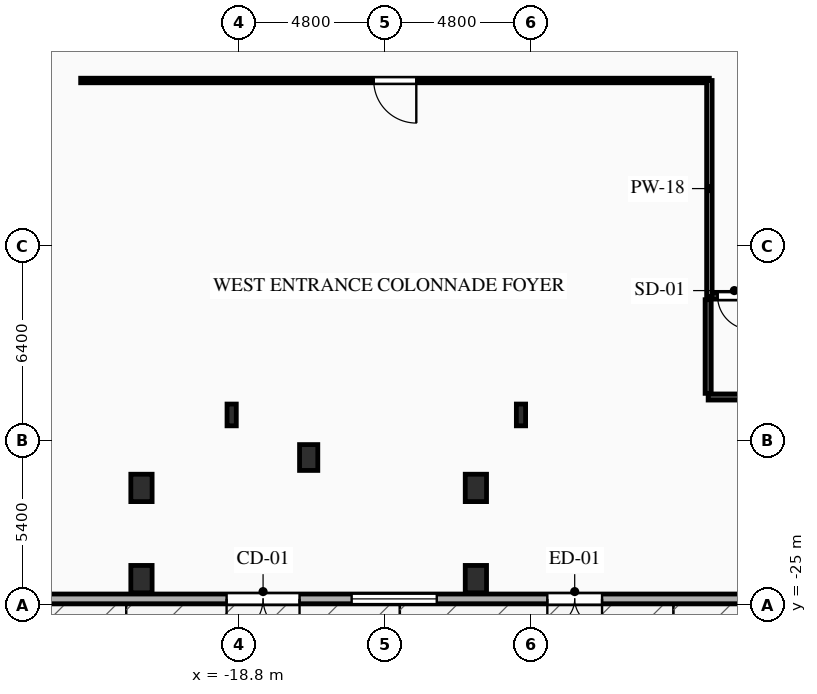
"""IFC4 building model, lengths in metres.
Left out: names, types, materials, properties, quantities, classifications, styles, units other than length and angle.
Written with IfcOpenShell. Run it as: python <this file> out.ifc"""

import sys

from ifc_helpers import new_model, si_unit, direction, frame, frame_2d, origin, origin_2d, place, context, subcontext, project, spatial, rectangle, i_section, extrude, element, fill, save


model = new_model("IFC4")
c1 = context("Model", 3, precision=1e-05, world=origin(), true_north=direction((0.0, 1.0)))
c2 = subcontext(c1, "Body", "Model", "MODEL_VIEW")
j1 = project(units=[si_unit("LENGTHUNIT", "METRE"), si_unit("PLANEANGLEUNIT", "RADIAN")], contexts=[c1])
p1 = place(None, origin())
s1 = spatial("IfcSite", under=j1, at=p1, CompositionType="ELEMENT")
p2 = place(p1, origin())
s2 = spatial("IfcBuilding", under=s1, at=p2, CompositionType="ELEMENT")
p3 = place(p2, origin())
s3 = spatial("IfcBuildingStorey", under=s2, at=p3, CompositionType="ELEMENT", Elevation=0.0)
for number, where, z_axis, x_axis in (
    (1, (-22.0, -21.15, 0.0), (0.0, 0.0, 1.0), (1.0, 0.0, 0.0)),
    (2, (-11.0, -21.15, 0.0), (0.0, 0.0, 1.0), (1.0, 0.0, 0.0)),
    (3, (-22.0, -24.15, 0.0), (0.0, 0.0, 1.0), (1.0, 0.0, 0.0)),
    (4, (-11.0, -24.15, 0.0), (0.0, 0.0, 1.0), (1.0, 0.0, 0.0)),
):
    element("IfcColumn", number, at=place(p3, frame(where, z_axis=z_axis, x_axis=x_axis)), inside=s3, PredefinedType="COLUMN", context=c2, shape_type="SweptSolid", body=[
        extrude(rectangle(XDim=0.7, YDim=0.9, at=origin_2d()), origin(), (0.0, 0.0, 1.0), 4.5),
    ])
p4 = place(p3, frame((-16.5, -20.15, 0.0), z_axis=(0.0, 0.0, 1.0), x_axis=(1.0, 0.0, 0.0)))
e5 = element("IfcColumn", 5, at=p4, inside=s3, PredefinedType="PILASTER", context=c2, shape_type="SweptSolid", body=[
    extrude(rectangle(XDim=0.6, YDim=0.85, at=origin_2d()), origin(), (0.0, 0.0, 1.0), 4.5),
])
for number, where, z_axis, x_axis in (
    (6, (-19.033, -18.75, 0.0), (0.0, 0.0, 1.0), (1.0, 0.0, 0.0)),
    (7, (-9.517, -18.75, 0.0), (0.0, 0.0, 1.0), (1.0, 0.0, 0.0)),
):
    element("IfcColumn", number, at=place(p3, frame(where, z_axis=z_axis, x_axis=x_axis)), inside=s3, PredefinedType="COLUMN", context=c2, shape_type="SweptSolid", body=[
        extrude(i_section(OverallWidth=0.304, OverallDepth=0.716, WebThickness=0.021, FlangeThickness=0.04, FilletRadius=0.027, at=origin_2d()), origin(), (0.0, 0.0, 1.0), 4.5),
    ])
p5 = place(p3, frame((38.3, -24.8, 0.0), z_axis=(0.0, 0.0, 1.0), x_axis=(-1.0, 0.0, 0.0)))
e8 = element("IfcWall", 8, at=p5, inside=s3, PredefinedType="SOLIDWALL", context=c2, shape_type="SweptSolid", body=[
    extrude(rectangle(XDim=76.6, YDim=0.32, at=frame_2d((38.3, 0.0))), origin(), (0.0, 0.0, 1.0), 4.17),
])
p6 = place(p5, frame((64.4, 0.0, 0.0)))
e9 = element("IfcOpeningElement", 9, at=p6, cuts=e8, PredefinedType="OPENING", context=c2, shape_type="SweptSolid", body=[
    extrude(rectangle(XDim=1.8, YDim=2.4, at=frame_2d((0.9, 1.2))), frame((0.0, 0.17, 0.0), z_axis=(0.0, -1.0, 0.0), x_axis=(1.0, 0.0, 0.0)), (0.0, 0.0, 1.0), 0.34),
])
p7 = place(p5, frame((45.15, 0.0, 0.0)))
e10 = element("IfcOpeningElement", 10, at=p7, cuts=e8, PredefinedType="OPENING", context=c2, shape_type="SweptSolid", body=[
    extrude(rectangle(XDim=1.8, YDim=2.4, at=frame_2d((0.9, 1.2))), frame((0.0, 0.17, 0.0), z_axis=(0.0, -1.0, 0.0), x_axis=(1.0, 0.0, 0.0)), (0.0, 0.0, 1.0), 0.34),
])
p8 = place(p5, frame((29.65, 0.0, 0.0)))
e11 = element("IfcOpeningElement", 11, at=p8, cuts=e8, PredefinedType="OPENING", context=c2, shape_type="SweptSolid", body=[
    extrude(rectangle(XDim=1.8, YDim=2.4, at=frame_2d((0.9, 1.2))), frame((0.0, 0.17, 0.0), z_axis=(0.0, -1.0, 0.0), x_axis=(1.0, 0.0, 0.0)), (0.0, 0.0, 1.0), 0.34),
])
p9 = place(p5, frame((10.4, 0.0, 0.0)))
e12 = element("IfcOpeningElement", 12, at=p9, cuts=e8, PredefinedType="OPENING", context=c2, shape_type="SweptSolid", body=[
    extrude(rectangle(XDim=1.8, YDim=2.4, at=frame_2d((0.9, 1.2))), frame((0.0, 0.17, 0.0), z_axis=(0.0, -1.0, 0.0), x_axis=(1.0, 0.0, 0.0)), (0.0, 0.0, 1.0), 0.34),
])
p10 = place(p5, frame((55.1, 0.0, 0.0)))
e13 = element("IfcOpeningElement", 13, at=p10, cuts=e8, PredefinedType="OPENING", context=c2, shape_type="SweptSolid", body=[
    extrude(rectangle(XDim=2.4, YDim=2.6, at=frame_2d((1.2, 1.3))), frame((0.0, 0.17, 0.0), z_axis=(0.0, -1.0, 0.0), x_axis=(1.0, 0.0, 0.0)), (0.0, 0.0, 1.0), 0.34),
])
p11 = place(p5, frame((19.1, 0.0, 0.0)))
e14 = element("IfcOpeningElement", 14, at=p11, cuts=e8, PredefinedType="OPENING", context=c2, shape_type="SweptSolid", body=[
    extrude(rectangle(XDim=2.4, YDim=2.6, at=frame_2d((1.2, 1.3))), frame((0.0, 0.17, 0.0), z_axis=(0.0, -1.0, 0.0), x_axis=(1.0, 0.0, 0.0)), (0.0, 0.0, 1.0), 0.34),
])
p12 = place(p5, frame((32.471, 0.0, 0.85)))
e15 = element("IfcOpeningElement", 15, at=p12, cuts=e8, PredefinedType="OPENING", context=c2, shape_type="SweptSolid", body=[
    extrude(rectangle(XDim=2.8, YDim=2.4, at=frame_2d((1.4, 1.2))), frame((0.0, 0.17, 0.0), z_axis=(0.0, -1.0, 0.0), x_axis=(1.0, 0.0, 0.0)), (0.0, 0.0, 1.0), 0.34),
])
p13 = place(p5, frame((50.587, 0.0, 0.85)))
e16 = element("IfcOpeningElement", 16, at=p13, cuts=e8, PredefinedType="OPENING", context=c2, shape_type="SweptSolid", body=[
    extrude(rectangle(XDim=2.8, YDim=2.4, at=frame_2d((1.4, 1.2))), frame((0.0, 0.17, 0.0), z_axis=(0.0, -1.0, 0.0), x_axis=(1.0, 0.0, 0.0)), (0.0, 0.0, 1.0), 0.34),
])
p14 = place(p3, frame((3.86, -14.84, 0.0), z_axis=(0.0, 0.0, 1.0), x_axis=(-1.0, 0.0, 0.0)))
e17 = element("IfcWall", 17, at=p14, inside=s3, PredefinedType="SHEAR", context=c2, shape_type="SweptSolid", body=[
    extrude(rectangle(XDim=7.22, YDim=0.2, at=frame_2d((3.61, 0.0))), origin(), (0.0, 0.0, 1.0), 4.17),
])
p15 = place(p14, frame((5.81, 0.0, 0.0)))
e18 = element("IfcOpeningElement", 18, at=p15, cuts=e17, PredefinedType="OPENING", context=c2, shape_type="SweptSolid", body=[
    extrude(rectangle(XDim=1.1, YDim=2.15, at=frame_2d((0.55, 1.075))), frame((0.0, 0.11, 0.0), z_axis=(0.0, -1.0, 0.0), x_axis=(1.0, 0.0, 0.0)), (0.0, 0.0, 1.0), 0.22),
])
p16 = place(p3, frame((-3.36, -18.16, 0.0), z_axis=(0.0, 0.0, 1.0), x_axis=(1.0, 0.0, 0.0)))
e19 = element("IfcWall", 19, at=p16, inside=s3, PredefinedType="SHEAR", context=c2, shape_type="SweptSolid", body=[
    extrude(rectangle(XDim=7.22, YDim=0.2, at=frame_2d((3.61, 0.0))), origin(), (0.0, 0.0, 1.0), 4.17),
])
p17 = place(p3, frame((-3.36, -18.04, 0.0), z_axis=(0.0, 0.0, 1.0), x_axis=(0.0, 1.0, 0.0)))
e20 = element("IfcWall", 20, at=p17, inside=s3, PredefinedType="SHEAR", context=c2, shape_type="SweptSolid", body=[
    extrude(rectangle(XDim=3.08, YDim=0.2, at=frame_2d((1.54, 0.0))), origin(), (0.0, 0.0, 1.0), 4.17),
])
p18 = place(p3, frame((-3.32, -7.75, 0.0), z_axis=(0.0, 0.0, 1.0), x_axis=(-1.0, 0.0, 0.0)))
e21 = element("IfcWall", 21, at=p18, inside=s3, PredefinedType="PARTITIONING", context=c2, shape_type="SweptSolid", body=[
    extrude(rectangle(XDim=20.68, YDim=0.15, at=frame_2d((10.34, 0.0))), origin(), (0.0, 0.0, 1.0), 4.17),
])
p19 = place(p18, frame((9.64, 0.0, 0.0)))
e22 = element("IfcOpeningElement", 22, at=p19, cuts=e21, PredefinedType="OPENING", context=c2, shape_type="SweptSolid", body=[
    extrude(rectangle(XDim=1.4, YDim=2.3, at=frame_2d((0.7, 1.15))), frame((0.0, 0.085, 0.0), z_axis=(0.0, -1.0, 0.0), x_axis=(1.0, 0.0, 0.0)), (0.0, 0.0, 1.0), 0.17),
])
p20 = place(p3, frame((-3.32, -14.86, 0.0), z_axis=(0.0, 0.0, 1.0), x_axis=(0.0, 1.0, 0.0)))
e23 = element("IfcWall", 23, at=p20, inside=s3, PredefinedType="PARTITIONING", context=c2, shape_type="SweptSolid", body=[
    extrude(rectangle(XDim=7.11, YDim=0.18, at=frame_2d((3.555, 0.0))), origin(), (0.0, 0.0, 1.0), 4.17),
])
p21 = place(p7, origin())
e24 = element("IfcDoor", 24, at=p21, inside=s3, OperationType="DOUBLE_DOOR_SINGLE_SWING", PredefinedType="DOOR", context=c2, shape_type="SweptSolid", body=[
    extrude(rectangle(XDim=1.8, YDim=2.4, at=frame_2d((0.9, 1.2))), frame((0.0, 0.025, 0.0), z_axis=(0.0, -1.0, 0.0), x_axis=(1.0, 0.0, 0.0)), (0.0, 0.0, 1.0), 0.05),
])
fill(e10, e24)
p22 = place(p10, origin())
e25 = element("IfcDoor", 25, at=p22, inside=s3, OperationType="DOUBLE_DOOR_SINGLE_SWING", PredefinedType="DOOR", context=c2, shape_type="SweptSolid", body=[
    extrude(rectangle(XDim=2.4, YDim=2.6, at=frame_2d((1.2, 1.3))), frame((0.0, 0.025, 0.0), z_axis=(0.0, -1.0, 0.0), x_axis=(1.0, 0.0, 0.0)), (0.0, 0.0, 1.0), 0.05),
])
fill(e13, e25)
p23 = place(p13, origin())
e26 = element("IfcWindow", 26, at=p23, inside=s3, PartitioningType="SINGLE_PANEL", PredefinedType="WINDOW", context=c2, shape_type="SweptSolid", body=[
    extrude(rectangle(XDim=2.8, YDim=2.4, at=frame_2d((1.4, 1.2))), frame((0.0, 0.03, 0.0), z_axis=(0.0, -1.0, 0.0), x_axis=(1.0, 0.0, 0.0)), (0.0, 0.0, 1.0), 0.06),
])
fill(e16, e26)
p24 = place(p15, origin())
e27 = element("IfcDoor", 27, at=p24, inside=s3, OperationType="SINGLE_SWING_LEFT", PredefinedType="DOOR", context=c2, shape_type="SweptSolid", body=[
    extrude(rectangle(XDim=1.1, YDim=2.15, at=frame_2d((0.55, 1.075))), frame((0.0, 0.025, 0.0), z_axis=(0.0, -1.0, 0.0), x_axis=(1.0, 0.0, 0.0)), (0.0, 0.0, 1.0), 0.05),
])
fill(e18, e27)
p25 = place(p19, origin())
e28 = element("IfcDoor", 28, at=p25, inside=s3, OperationType="SINGLE_SWING_LEFT", PredefinedType="DOOR", context=c2, shape_type="SweptSolid", body=[
    extrude(rectangle(XDim=1.4, YDim=2.3, at=frame_2d((0.7, 1.15))), frame((0.0, 0.025, 0.0), z_axis=(0.0, -1.0, 0.0), x_axis=(1.0, 0.0, 0.0)), (0.0, 0.0, 1.0), 0.05),
])
fill(e22, e28)
save(model, sys.argv[1])
